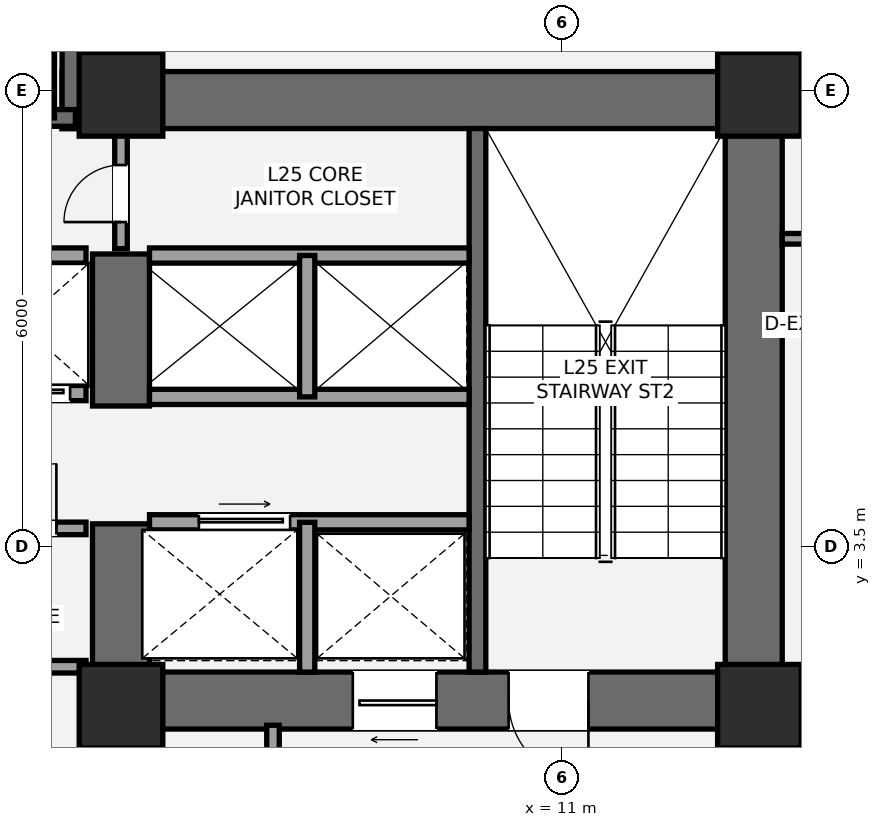
"""IFC4 building model, lengths in metres.
Left out: names, types, materials, properties, quantities, classifications, styles, units other than length and angle.
Written with IfcOpenShell. Run it as: python <this file> out.ifc"""

import sys

from ifc_helpers import new_model, si_unit, direction, frame, frame_2d, origin, origin_2d, place, context, subcontext, project, spatial, rectangle, extrude, element, fill, save


model = new_model("IFC4")
c1 = context("Model", 3, precision=1e-05, world=origin(), true_north=direction((0.0, 1.0)))
c2 = subcontext(c1, "Body", "Model", "MODEL_VIEW")
j1 = project(units=[si_unit("LENGTHUNIT", "METRE"), si_unit("PLANEANGLEUNIT", "RADIAN")], contexts=[c1])
p1 = place(None, origin())
s1 = spatial("IfcSite", under=j1, at=p1, CompositionType="ELEMENT")
p2 = place(p1, origin())
s2 = spatial("IfcBuilding", under=s1, at=p2, CompositionType="ELEMENT")
p3 = place(p2, frame((0.0, 0.0, 96.6)))
s3 = spatial("IfcBuildingStorey", under=s2, at=p3, CompositionType="ELEMENT", Elevation=96.6)
p4 = place(p3, frame((13.525, 1.1, 0.0), z_axis=(0.0, 0.0, 1.0), x_axis=(0.0, 1.0, 0.0)))
e1 = element("IfcWall", 1, at=p4, inside=s3, PredefinedType="SHEAR", context=c2, shape_type="SweptSolid", body=[
    extrude(rectangle(XDim=8.65, YDim=0.75, at=frame_2d((4.325, 0.0))), origin(), (0.0, 0.0, 1.0), 3.5),
])
p5 = place(p3, frame((4.425, 9.375, 0.0), z_axis=(0.0, 0.0, 1.0), x_axis=(1.0, 0.0, 0.0)))
e2 = element("IfcWall", 2, at=p5, inside=s3, PredefinedType="SHEAR", context=c2, shape_type="SweptSolid", body=[
    extrude(rectangle(XDim=9.475, YDim=0.75, at=frame_2d((4.737, 0.0))), origin(), (0.0, 0.0, 1.0), 3.5),
])
p6 = place(p3, frame((13.9, 1.475, 0.0), z_axis=(0.0, 0.0, 1.0), x_axis=(-1.0, 0.0, 0.0)))
e3 = element("IfcWall", 3, at=p6, inside=s3, PredefinedType="SHEAR", context=c2, shape_type="SweptSolid", body=[
    extrude(rectangle(XDim=9.075, YDim=0.75, at=frame_2d((4.538, 0.0))), origin(), (0.0, 0.0, 1.0), 3.5),
])
p7 = place(p6, frame((2.55, 0.0, 0.0)))
e4 = element("IfcOpeningElement", 4, at=p7, cuts=e3, PredefinedType="OPENING", context=c2, shape_type="SweptSolid", body=[
    extrude(rectangle(XDim=1.05, YDim=2.15, at=frame_2d((0.525, 1.075))), frame((0.0, 0.385, 0.0), z_axis=(0.0, -1.0, 0.0), x_axis=(1.0, 0.0, 0.0)), (0.0, 0.0, 1.0), 0.77),
])
p8 = place(p6, frame((4.55, 0.0, 0.0)))
e5 = element("IfcOpeningElement", 5, at=p8, cuts=e3, PredefinedType="OPENING", context=c2, shape_type="SweptSolid", body=[
    extrude(rectangle(XDim=1.1, YDim=2.2, at=frame_2d((0.55, 1.1))), frame((0.0, 0.385, 0.0), z_axis=(0.0, -1.0, 0.0), x_axis=(1.0, 0.0, 0.0)), (0.0, 0.0, 1.0), 0.77),
])
p9 = place(p3, frame((5.2, 1.1, 0.0), z_axis=(0.0, 0.0, 1.0), x_axis=(0.0, 1.0, 0.0)))
e6 = element("IfcWall", 6, at=p9, inside=s3, PredefinedType="SHEAR", context=c2, shape_type="SweptSolid", body=[
    extrude(rectangle(XDim=2.7, YDim=0.75, at=frame_2d((1.35, 0.0))), origin(), (0.0, 0.0, 1.0), 3.5),
])
p10 = place(p3, frame((5.2, 5.35, 0.0), z_axis=(0.0, 0.0, 1.0), x_axis=(0.0, 1.0, 0.0)))
e7 = element("IfcWall", 7, at=p10, inside=s3, PredefinedType="SHEAR", context=c2, shape_type="SweptSolid", body=[
    extrude(rectangle(XDim=2.0, YDim=0.75, at=frame_2d((1.0, 0.0))), origin(), (0.0, 0.0, 1.0), 3.5),
])
p11 = place(p3, frame((9.89, 1.85, 0.0), z_axis=(0.0, 0.0, 1.0), x_axis=(0.0, 1.0, 0.0)))
e8 = element("IfcWall", 8, at=p11, inside=s3, PredefinedType="SHEAR", context=c2, shape_type="SweptSolid", body=[
    extrude(rectangle(XDim=7.15, YDim=0.22, at=frame_2d((3.575, 0.0))), origin(), (0.0, 0.0, 1.0), 3.5),
])
p12 = place(p3, frame((4.8, 9.0, 0.0), z_axis=(0.0, 0.0, 1.0), x_axis=(0.0, 1.0, 0.0)))
e9 = element("IfcWall", 9, at=p12, inside=s3, PredefinedType="SHEAR", context=c2, shape_type="SweptSolid", body=[
    extrude(rectangle(XDim=4.15, YDim=0.75, at=frame_2d((2.075, 0.0))), origin(), (0.0, 0.0, 1.0), 3.5),
])
p13 = place(p3, frame((-4.7, 9.14, 0.0), z_axis=(0.0, 0.0, 1.0), x_axis=(1.0, 0.0, 0.0)))
e10 = element("IfcWall", 10, at=p13, inside=s3, PredefinedType="SHEAR", context=c2, shape_type="SweptSolid", body=[
    extrude(rectangle(XDim=9.3, YDim=0.22, at=frame_2d((4.65, 0.0))), origin(), (0.0, 0.0, 1.0), 3.5),
])
p14 = place(p13, frame((1.15, 0.0, 0.0)))
e11 = element("IfcOpeningElement", 11, at=p14, cuts=e10, PredefinedType="OPENING", context=c2, shape_type="SweptSolid", body=[
    extrude(rectangle(XDim=1.05, YDim=2.15, at=frame_2d((0.525, 1.075))), frame((0.0, 0.12, 0.0), z_axis=(0.0, -1.0, 0.0), x_axis=(1.0, 0.0, 0.0)), (0.0, 0.0, 1.0), 0.24),
])
p15 = place(p3, frame((4.215, 9.14, 0.0), z_axis=(0.0, 0.0, 1.0), x_axis=(0.0, 1.0, 0.0)))
e12 = element("IfcWall", 12, at=p15, inside=s3, PredefinedType="SHEAR", context=c2, shape_type="SweptSolid", body=[
    extrude(rectangle(XDim=3.26, YDim=0.22, at=frame_2d((1.63, 0.0))), origin(), (0.0, 0.0, 1.0), 3.5),
])
for number, where, z_axis, x_axis in (
    (13, (5.2, 1.4, 0.0), (0.0, 0.0, 1.0), (1.0, 0.0, 0.0)),
    (14, (5.2, 9.45, 0.0), (0.0, 0.0, 1.0), (1.0, 0.0, 0.0)),
    (15, (13.6, 1.4, 0.0), (0.0, 0.0, 1.0), (1.0, 0.0, 0.0)),
    (16, (13.6, 9.45, 0.0), (0.0, 0.0, 1.0), (1.0, 0.0, 0.0)),
):
    element("IfcColumn", number, at=place(p3, frame(where, z_axis=z_axis, x_axis=x_axis)), inside=s3, PredefinedType="COLUMN", context=c2, shape_type="SweptSolid", body=[
        extrude(rectangle(XDim=1.1, YDim=1.1, at=origin_2d()), origin(), (0.0, 0.0, 1.0), 3.5),
    ])
p16 = place(p3, frame((7.2, -2.15, 0.0), z_axis=(0.0, 0.0, 1.0), x_axis=(0.0, 1.0, 0.0)))
e17 = element("IfcWall", 17, at=p16, inside=s3, PredefinedType="PARTITIONING", context=c2, shape_type="SweptSolid", body=[
    extrude(rectangle(XDim=3.3, YDim=0.165, at=frame_2d((1.65, 0.0))), origin(), (0.0, 0.0, 1.0), 3.31),
])
p17 = place(p3, frame((13.45, -2.15, 0.0), z_axis=(0.0, 0.0, 1.0), x_axis=(0.0, 1.0, 0.0)))
e18 = element("IfcWall", 18, at=p17, inside=s3, PredefinedType="PARTITIONING", context=c2, shape_type="SweptSolid", body=[
    extrude(rectangle(XDim=3.3, YDim=0.165, at=frame_2d((1.65, 0.0))), origin(), (0.0, 0.0, 1.0), 2.763),
])
p18 = place(p17, frame((1.15, 0.0, 0.0)))
e19 = element("IfcOpeningElement", 19, at=p18, cuts=e18, PredefinedType="OPENING", context=c2, shape_type="SweptSolid", body=[
    extrude(rectangle(XDim=1.05, YDim=2.15, at=frame_2d((0.525, 1.075))), frame((0.0, 0.093, 0.0), z_axis=(0.0, -1.0, 0.0), x_axis=(1.0, 0.0, 0.0)), (0.0, 0.0, 1.0), 0.185),
])
p19 = place(p3, frame((4.95, -2.15, 0.0), z_axis=(0.0, 0.0, 1.0), x_axis=(0.0, 1.0, 0.0)))
e20 = element("IfcWall", 20, at=p19, inside=s3, PredefinedType="SOLIDWALL", context=c2, shape_type="SweptSolid", body=[
    extrude(rectangle(XDim=3.3, YDim=0.2, at=frame_2d((1.65, 0.0))), origin(), (0.0, 0.0, 1.0), 3.31),
])
p20 = place(p19, frame((0.95, 0.0, 0.0)))
e21 = element("IfcOpeningElement", 21, at=p20, cuts=e20, PredefinedType="OPENING", context=c2, shape_type="SweptSolid", body=[
    extrude(rectangle(XDim=0.75, YDim=2.1, at=frame_2d((0.375, 1.05))), frame((0.0, 0.11, 0.0), z_axis=(0.0, -1.0, 0.0), x_axis=(1.0, 0.0, 0.0)), (0.0, 0.0, 1.0), 0.22),
])
p21 = place(p3, frame((5.575, 3.82, 0.0), z_axis=(0.0, 0.0, 1.0), x_axis=(1.0, 0.0, 0.0)))
e22 = element("IfcWall", 22, at=p21, inside=s3, PredefinedType="SOLIDWALL", context=c2, shape_type="SweptSolid", body=[
    extrude(rectangle(XDim=4.205, YDim=0.2, at=frame_2d((2.103, 0.0))), origin(), (0.0, 0.0, 1.0), 3.31),
])
p22 = place(p21, frame((0.65, 0.0, 0.0)))
e23 = element("IfcOpeningElement", 23, at=p22, cuts=e22, PredefinedType="OPENING", context=c2, shape_type="SweptSolid", body=[
    extrude(rectangle(XDim=1.2, YDim=2.2, at=frame_2d((0.6, 1.1))), frame((0.0, 0.11, 0.0), z_axis=(0.0, -1.0, 0.0), x_axis=(1.0, 0.0, 0.0)), (0.0, 0.0, 1.0), 0.22),
])
p23 = place(p3, frame((7.65, 1.85, 0.0), z_axis=(0.0, 0.0, 1.0), x_axis=(0.0, 1.0, 0.0)))
e24 = element("IfcWall", 24, at=p23, inside=s3, PredefinedType="SOLIDWALL", context=c2, shape_type="SweptSolid", body=[
    extrude(rectangle(XDim=1.97, YDim=0.2, at=frame_2d((0.985, 0.0))), origin(), (0.0, 0.0, 1.0), 3.31),
])
for number, where, z_axis, x_axis in (
    (25, (5.575, 5.47, 0.0), (0.0, 0.0, 1.0), (1.0, 0.0, 0.0)),
    (26, (5.575, 7.33, 0.0), (0.0, 0.0, 1.0), (1.0, 0.0, 0.0)),
):
    element("IfcWall", number, at=place(p3, frame(where, z_axis=z_axis, x_axis=x_axis)), inside=s3, PredefinedType="SOLIDWALL", context=c2, shape_type="SweptSolid", body=[
        extrude(rectangle(XDim=4.205, YDim=0.2, at=frame_2d((2.103, 0.0))), origin(), (0.0, 0.0, 1.0), 3.31),
    ])
p24 = place(p3, frame((7.65, 5.47, 0.0), z_axis=(0.0, 0.0, 1.0), x_axis=(0.0, 1.0, 0.0)))
e27 = element("IfcWall", 27, at=p24, inside=s3, PredefinedType="SOLIDWALL", context=c2, shape_type="SweptSolid", body=[
    extrude(rectangle(XDim=1.86, YDim=0.2, at=frame_2d((0.93, 0.0))), origin(), (0.0, 0.0, 1.0), 3.31),
])
p25 = place(p3, frame((0.85, 1.92, 0.0), z_axis=(0.0, 0.0, 1.0), x_axis=(1.0, 0.0, 0.0)))
e28 = element("IfcWall", 28, at=p25, inside=s3, PredefinedType="PARTITIONING", context=c2, shape_type="SweptSolid", body=[
    extrude(rectangle(XDim=3.89, YDim=0.165, at=frame_2d((1.945, 0.0))), origin(), (0.0, 0.0, 1.0), 2.3),
])
p26 = place(p3, frame((0.85, 3.74, 0.0), z_axis=(0.0, 0.0, 1.0), x_axis=(1.0, 0.0, 0.0)))
e29 = element("IfcWall", 29, at=p26, inside=s3, PredefinedType="PARTITIONING", context=c2, shape_type="SweptSolid", body=[
    extrude(rectangle(XDim=3.89, YDim=0.165, at=frame_2d((1.945, 0.0))), origin(), (0.0, 0.0, 1.0), 3.31),
])
p27 = place(p26, frame((0.55, 0.0, 0.0)))
e30 = element("IfcOpeningElement", 30, at=p27, cuts=e29, PredefinedType="OPENING", context=c2, shape_type="SweptSolid", body=[
    extrude(rectangle(XDim=0.85, YDim=2.1, at=frame_2d((0.425, 1.05))), frame((0.0, 0.093, 0.0), z_axis=(0.0, -1.0, 0.0), x_axis=(1.0, 0.0, 0.0)), (0.0, 0.0, 1.0), 0.185),
])
p28 = place(p26, frame((2.65, 0.0, 0.0)))
e31 = element("IfcOpeningElement", 31, at=p28, cuts=e29, PredefinedType="OPENING", context=c2, shape_type="SweptSolid", body=[
    extrude(rectangle(XDim=0.85, YDim=2.1, at=frame_2d((0.425, 1.05))), frame((0.0, 0.093, 0.0), z_axis=(0.0, -1.0, 0.0), x_axis=(1.0, 0.0, 0.0)), (0.0, 0.0, 1.0), 0.185),
])
p29 = place(p3, frame((0.88, 5.52, 0.0), z_axis=(0.0, 0.0, 1.0), x_axis=(1.0, 0.0, 0.0)))
e32 = element("IfcWall", 32, at=p29, inside=s3, PredefinedType="SOLIDWALL", context=c2, shape_type="SweptSolid", body=[
    extrude(rectangle(XDim=3.86, YDim=0.2, at=frame_2d((1.93, 0.0))), origin(), (0.0, 0.0, 1.0), 3.31),
])
p30 = place(p29, frame((0.55, 0.0, 0.0)))
e33 = element("IfcOpeningElement", 33, at=p30, cuts=e32, PredefinedType="OPENING", context=c2, shape_type="SweptSolid", body=[
    extrude(rectangle(XDim=1.1, YDim=2.2, at=frame_2d((0.55, 1.1))), frame((0.0, 0.11, 0.0), z_axis=(0.0, -1.0, 0.0), x_axis=(1.0, 0.0, 0.0)), (0.0, 0.0, 1.0), 0.22),
])
p31 = place(p29, frame((2.55, 0.0, 0.0)))
e34 = element("IfcOpeningElement", 34, at=p31, cuts=e32, PredefinedType="OPENING", context=c2, shape_type="SweptSolid", body=[
    extrude(rectangle(XDim=1.1, YDim=2.2, at=frame_2d((0.55, 1.1))), frame((0.0, 0.11, 0.0), z_axis=(0.0, -1.0, 0.0), x_axis=(1.0, 0.0, 0.0)), (0.0, 0.0, 1.0), 0.22),
])
p32 = place(p3, frame((0.88, 7.33, 0.0), z_axis=(0.0, 0.0, 1.0), x_axis=(1.0, 0.0, 0.0)))
e35 = element("IfcWall", 35, at=p32, inside=s3, PredefinedType="SOLIDWALL", context=c2, shape_type="SweptSolid", body=[
    extrude(rectangle(XDim=3.86, YDim=0.2, at=frame_2d((1.93, 0.0))), origin(), (0.0, 0.0, 1.0), 3.31),
])
p33 = place(p3, frame((5.2, 7.42, 0.0), z_axis=(0.0, 0.0, 1.0), x_axis=(0.0, 1.0, 0.0)))
e36 = element("IfcWall", 36, at=p33, inside=s3, PredefinedType="PARTITIONING", context=c2, shape_type="SweptSolid", body=[
    extrude(rectangle(XDim=1.58, YDim=0.165, at=frame_2d((0.79, 0.0))), origin(), (0.0, 0.0, 1.0), 3.31),
])
p34 = place(p33, frame((0.35, 0.0, 0.0)))
e37 = element("IfcOpeningElement", 37, at=p34, cuts=e36, PredefinedType="OPENING", context=c2, shape_type="SweptSolid", body=[
    extrude(rectangle(XDim=0.75, YDim=2.1, at=frame_2d((0.375, 1.05))), frame((0.0, 0.093, 0.0), z_axis=(0.0, -1.0, 0.0), x_axis=(1.0, 0.0, 0.0)), (0.0, 0.0, 1.0), 0.185),
])
p35 = place(p3, frame((13.9, 7.55, 0.0), z_axis=(0.0, 0.0, 1.0), x_axis=(1.0, 0.0, 0.0)))
e38 = element("IfcWall", 38, at=p35, inside=s3, PredefinedType="PARTITIONING", context=c2, shape_type="SweptSolid", body=[
    extrude(rectangle(XDim=3.6, YDim=0.14, at=frame_2d((1.8, 0.0))), origin(), (0.0, 0.0, 1.0), 2.763),
])
p36 = place(p35, frame((0.32, 0.0, 0.0)))
e39 = element("IfcOpeningElement", 39, at=p36, cuts=e38, PredefinedType="OPENING", context=c2, shape_type="SweptSolid", body=[
    extrude(rectangle(XDim=0.92, YDim=2.15, at=frame_2d((0.46, 1.075))), frame((0.0, 0.08, 0.0), z_axis=(0.0, -1.0, 0.0), x_axis=(1.0, 0.0, 0.0)), (0.0, 0.0, 1.0), 0.16),
])
p37 = place(p7, origin())
e40 = element("IfcDoor", 40, at=p37, inside=s3, OperationType="SINGLE_SWING_LEFT", PredefinedType="DOOR", context=c2, shape_type="SweptSolid", body=[
    extrude(rectangle(XDim=1.05, YDim=2.15, at=frame_2d((0.525, 1.075))), frame((0.0, 0.025, 0.0), z_axis=(0.0, -1.0, 0.0), x_axis=(1.0, 0.0, 0.0)), (0.0, 0.0, 1.0), 0.05),
])
fill(e4, e40)
p38 = place(p8, origin())
e41 = element("IfcDoor", 41, at=p38, inside=s3, OperationType="SLIDING_TO_LEFT", PredefinedType="DOOR", context=c2, shape_type="SweptSolid", body=[
    extrude(rectangle(XDim=1.1, YDim=2.2, at=frame_2d((0.55, 1.1))), frame((0.0, 0.025, 0.0), z_axis=(0.0, -1.0, 0.0), x_axis=(1.0, 0.0, 0.0)), (0.0, 0.0, 1.0), 0.05),
])
fill(e5, e41)
p39 = place(p22, origin())
e42 = element("IfcDoor", 42, at=p39, inside=s3, OperationType="SLIDING_TO_RIGHT", PredefinedType="DOOR", context=c2, shape_type="SweptSolid", body=[
    extrude(rectangle(XDim=1.2, YDim=2.2, at=frame_2d((0.6, 1.1))), frame((0.0, 0.025, 0.0), z_axis=(0.0, -1.0, 0.0), x_axis=(1.0, 0.0, 0.0)), (0.0, 0.0, 1.0), 0.05),
])
fill(e23, e42)
p40 = place(p28, origin())
e43 = element("IfcDoor", 43, at=p40, inside=s3, OperationType="SINGLE_SWING_RIGHT", PredefinedType="DOOR", context=c2, shape_type="SweptSolid", body=[
    extrude(rectangle(XDim=0.85, YDim=2.1, at=frame_2d((0.425, 1.05))), frame((0.0, 0.025, 0.0), z_axis=(0.0, -1.0, 0.0), x_axis=(1.0, 0.0, 0.0)), (0.0, 0.0, 1.0), 0.05),
])
fill(e31, e43)
p41 = place(p31, origin())
e44 = element("IfcDoor", 44, at=p41, inside=s3, OperationType="SLIDING_TO_LEFT", PredefinedType="DOOR", context=c2, shape_type="SweptSolid", body=[
    extrude(rectangle(XDim=1.1, YDim=2.2, at=frame_2d((0.55, 1.1))), frame((0.0, 0.025, 0.0), z_axis=(0.0, -1.0, 0.0), x_axis=(1.0, 0.0, 0.0)), (0.0, 0.0, 1.0), 0.05),
])
fill(e34, e44)
p42 = place(p34, origin())
e45 = element("IfcDoor", 45, at=p42, inside=s3, OperationType="SINGLE_SWING_LEFT", PredefinedType="DOOR", context=c2, shape_type="SweptSolid", body=[
    extrude(rectangle(XDim=0.75, YDim=2.1, at=frame_2d((0.375, 1.05))), frame((0.0, 0.025, 0.0), z_axis=(0.0, -1.0, 0.0), x_axis=(1.0, 0.0, 0.0)), (0.0, 0.0, 1.0), 0.05),
])
fill(e37, e45)
save(model, sys.argv[1])
